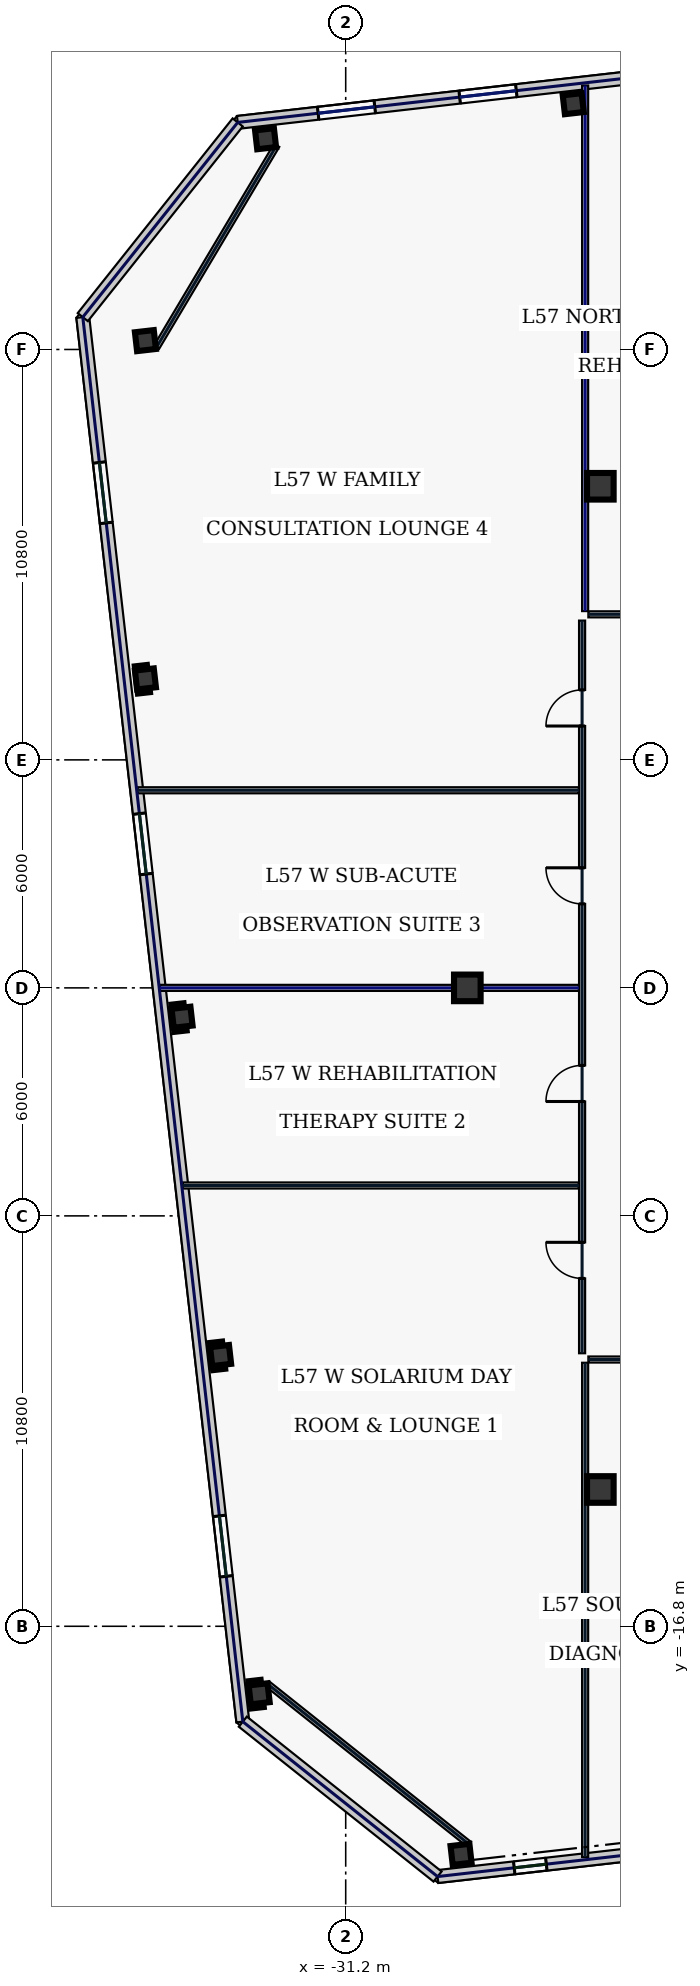
"""IFC4 building model, lengths in metres.
Left out: names, types, materials, properties, quantities, classifications, styles, units other than length and angle.
Written with IfcOpenShell. Run it as: python <this file> out.ifc"""

import sys

from ifc_helpers import new_model, si_unit, direction, frame, frame_2d, origin, origin_2d, place, context, subcontext, project, spatial, rectangle, hollow_rectangle, extrude, element, fill, save


model = new_model("IFC4")
c1 = context("Model", 3, precision=1e-05, world=origin(), true_north=direction((0.0, 1.0)))
c2 = subcontext(c1, "Body", "Model", "MODEL_VIEW")
j1 = project(units=[si_unit("LENGTHUNIT", "METRE"), si_unit("PLANEANGLEUNIT", "RADIAN")], contexts=[c1])
p1 = place(None, origin())
s1 = spatial("IfcSite", under=j1, at=p1, CompositionType="ELEMENT")
p2 = place(p1, origin())
s2 = spatial("IfcBuilding", under=s1, at=p2, CompositionType="ELEMENT")
p3 = place(p2, frame((0.0, 0.0, 247.0)))
s3 = spatial("IfcBuildingStorey", under=s2, at=p3, CompositionType="ELEMENT", Elevation=247.0)
for number, where, z_axis, x_axis in (
    (1, (-24.5, -13.2, 0.0), (0.0, 0.0, 1.0), (1.0, 0.0, 0.0)),
    (2, (-24.5, 13.2, 0.0), (0.0, 0.0, 1.0), (1.0, 0.0, 0.0)),
    (3, (-28.0, 0.0, 0.0), (0.0, 0.0, 1.0), (1.0, 0.0, 0.0)),
):
    element("IfcColumn", number, at=place(p3, frame(where, z_axis=z_axis, x_axis=x_axis)), inside=s3, PredefinedType="COLUMN", context=c2, shape_type="SweptSolid", body=[
        extrude(hollow_rectangle(XDim=0.7, YDim=0.7, WallThickness=0.032, at=origin_2d()), origin(), (0.0, 0.0, 1.0), 3.74),
    ])
for number, where, z_axis, x_axis in (
    (4, (-28.165, -22.802, 0.0), (0.0, 0.0, 1.0), (0.994, 0.113, 0.0)),
    (5, (-25.212, 23.268, 0.0), (0.0, 0.0, 1.0), (0.994, 0.113, 0.0)),
    (6, (-33.309, 22.345, 0.0), (0.0, 0.0, 1.0), (0.994, 0.113, 0.0)),
    (7, (-36.47, 17.033, 0.0), (0.0, 0.0, 1.0), (0.994, 0.113, 0.0)),
    (8, (-36.47, 8.131, 0.0), (0.0, 0.0, 1.0), (0.994, 0.113, 0.0)),
    (9, (-35.506, -0.772, 0.0), (0.0, 0.0, 1.0), (0.994, 0.113, 0.0)),
    (10, (-34.491, -9.674, 0.0), (0.0, 0.0, 1.0), (0.994, 0.113, 0.0)),
    (11, (-33.477, -18.577, 0.0), (0.0, 0.0, 1.0), (0.994, 0.113, 0.0)),
):
    element("IfcColumn", number, at=place(p3, frame(where, z_axis=z_axis, x_axis=x_axis)), inside=s3, PredefinedType="COLUMN", context=c2, shape_type="SweptSolid", body=[
        extrude(hollow_rectangle(XDim=0.5, YDim=0.5, WallThickness=0.025, at=origin_2d()), origin(), (0.0, 0.0, 1.0), 3.74),
    ])
p4 = place(p3, frame((-28.783, -23.386, 0.0), z_axis=(0.0, 0.0, 1.0), x_axis=(0.993572271362, 0.113199565282, 0.0)))
e12 = element("IfcWall", 12, at=p4, inside=s3, PredefinedType="STANDARD", context=c2, shape_type="SweptSolid", body=[
    extrude(rectangle(XDim=18.651, YDim=0.34, at=frame_2d((9.326, 0.0))), origin(), (0.0, 0.0, 1.0), 3.74),
])
p5 = place(p4, frame((2.03, 0.0, 0.88)))
e13 = element("IfcOpeningElement", 13, at=p5, cuts=e12, PredefinedType="OPENING", context=c2, shape_type="SweptSolid", body=[
    extrude(rectangle(XDim=0.85, YDim=1.85, at=frame_2d((0.425, 0.925))), frame((0.0, 0.18, 0.0), z_axis=(0.0, -1.0, 0.0), x_axis=(1.0, 0.0, 0.0)), (0.0, 0.0, 1.0), 0.36),
])
p6 = place(p4, frame((5.779, 0.0, 0.88)))
e14 = element("IfcOpeningElement", 14, at=p6, cuts=e12, PredefinedType="OPENING", context=c2, shape_type="SweptSolid", body=[
    extrude(rectangle(XDim=1.7, YDim=1.95, at=frame_2d((0.85, 0.975))), frame((0.0, 0.18, 0.0), z_axis=(0.0, -1.0, 0.0), x_axis=(1.0, 0.0, 0.0)), (0.0, 0.0, 1.0), 0.36),
])
p7 = place(p4, frame((10.179, 0.0, 0.88)))
e15 = element("IfcOpeningElement", 15, at=p7, cuts=e12, PredefinedType="OPENING", context=c2, shape_type="SweptSolid", body=[
    extrude(rectangle(XDim=1.7, YDim=1.95, at=frame_2d((0.85, 0.975))), frame((0.0, 0.18, 0.0), z_axis=(0.0, -1.0, 0.0), x_axis=(1.0, 0.0, 0.0)), (0.0, 0.0, 1.0), 0.36),
])
p8 = place(p3, frame((-15.51, 24.886, 0.0), z_axis=(0.0, 0.0, 1.0), x_axis=(-0.993572271362, -0.113199565282, 0.0)))
e16 = element("IfcWall", 16, at=p8, inside=s3, PredefinedType="STANDARD", context=c2, shape_type="SweptSolid", body=[
    extrude(rectangle(XDim=18.651, YDim=0.34, at=frame_2d((9.326, 0.0))), origin(), (0.0, 0.0, 1.0), 3.74),
])
p9 = place(p8, frame((15.021, 0.0, 0.83)))
e17 = element("IfcOpeningElement", 17, at=p9, cuts=e16, PredefinedType="OPENING", context=c2, shape_type="SweptSolid", body=[
    extrude(rectangle(XDim=1.5, YDim=2.0, at=frame_2d((0.75, 1.0))), frame((0.0, 0.18, 0.0), z_axis=(0.0, -1.0, 0.0), x_axis=(1.0, 0.0, 0.0)), (0.0, 0.0, 1.0), 0.36),
])
p10 = place(p8, frame((11.273, 0.0, 0.83)))
e18 = element("IfcOpeningElement", 18, at=p10, cuts=e16, PredefinedType="OPENING", context=c2, shape_type="SweptSolid", body=[
    extrude(rectangle(XDim=1.5, YDim=2.0, at=frame_2d((0.75, 1.0))), frame((0.0, 0.18, 0.0), z_axis=(0.0, -1.0, 0.0), x_axis=(1.0, 0.0, 0.0)), (0.0, 0.0, 1.0), 0.36),
])
p11 = place(p8, frame((6.873, 0.0, 0.83)))
e19 = element("IfcOpeningElement", 19, at=p11, cuts=e16, PredefinedType="OPENING", context=c2, shape_type="SweptSolid", body=[
    extrude(rectangle(XDim=1.5, YDim=2.0, at=frame_2d((0.75, 1.0))), frame((0.0, 0.18, 0.0), z_axis=(0.0, -1.0, 0.0), x_axis=(1.0, 0.0, 0.0)), (0.0, 0.0, 1.0), 0.36),
])
p12 = place(p8, frame((3.125, 0.0, 0.83)))
e20 = element("IfcOpeningElement", 20, at=p12, cuts=e16, PredefinedType="OPENING", context=c2, shape_type="SweptSolid", body=[
    extrude(rectangle(XDim=0.85, YDim=1.85, at=frame_2d((0.425, 0.925))), frame((0.0, 0.18, 0.0), z_axis=(0.0, -1.0, 0.0), x_axis=(1.0, 0.0, 0.0)), (0.0, 0.0, 1.0), 0.36),
])
p13 = place(p3, frame((-38.118, 17.651, 0.0), z_axis=(0.0, 0.0, 1.0), x_axis=(0.11320360501, -0.9935718111, 0.0)))
e21 = element("IfcWall", 21, at=p13, inside=s3, PredefinedType="STANDARD", context=c2, shape_type="SweptSolid", body=[
    extrude(rectangle(XDim=37.2, YDim=0.34, at=frame_2d((18.6, 0.0))), origin(), (0.0, 0.0, 1.0), 3.74),
])
p14 = place(p13, frame((3.85, 0.0, 0.58)))
e22 = element("IfcOpeningElement", 22, at=p14, cuts=e21, PredefinedType="OPENING", context=c2, shape_type="SweptSolid", body=[
    extrude(rectangle(XDim=1.6, YDim=2.3, at=frame_2d((0.8, 1.15))), frame((0.0, 0.18, 0.0), z_axis=(0.0, -1.0, 0.0), x_axis=(1.0, 0.0, 0.0)), (0.0, 0.0, 1.0), 0.36),
])
p15 = place(p13, frame((13.15, 0.0, 0.58)))
e23 = element("IfcOpeningElement", 23, at=p15, cuts=e21, PredefinedType="OPENING", context=c2, shape_type="SweptSolid", body=[
    extrude(rectangle(XDim=1.6, YDim=2.3, at=frame_2d((0.8, 1.15))), frame((0.0, 0.18, 0.0), z_axis=(0.0, -1.0, 0.0), x_axis=(1.0, 0.0, 0.0)), (0.0, 0.0, 1.0), 0.36),
])
p16 = place(p13, frame((31.75, 0.0, 0.58)))
e24 = element("IfcOpeningElement", 24, at=p16, cuts=e21, PredefinedType="OPENING", context=c2, shape_type="SweptSolid", body=[
    extrude(rectangle(XDim=1.6, YDim=2.3, at=frame_2d((0.8, 1.15))), frame((0.0, 0.18, 0.0), z_axis=(0.0, -1.0, 0.0), x_axis=(1.0, 0.0, 0.0)), (0.0, 0.0, 1.0), 0.36),
])
for number, where, z_axis, x_axis in (
    (25, (-34.042, 22.775, 0.0), (0.0, 0.0, 1.0), (-0.623, -0.783, 0.0)),
    (26, (-33.907, -19.31, 0.0), (0.0, 0.0, 1.0), (0.783, -0.623, 0.0)),
):
    element("IfcWall", number, at=place(p3, frame(where, z_axis=z_axis, x_axis=x_axis)), inside=s3, PredefinedType="STANDARD", context=c2, shape_type="SweptSolid", body=[
        extrude(rectangle(XDim=6.548, YDim=0.34, at=frame_2d((3.274, 0.0))), origin(), (0.0, 0.0, 1.0), 3.74),
    ])
p17 = place(p3, frame((-33.016, 22.171, 0.0), z_axis=(0.0, 0.0, 1.0), x_axis=(-0.511385266265, -0.859351563359, 0.0)))
e27 = element("IfcWall", 27, at=p17, inside=s3, PredefinedType="PARTITIONING", context=c2, shape_type="SweptSolid", body=[
    extrude(rectangle(XDim=6.182, YDim=0.16, at=frame_2d((3.091, 0.0))), origin(), (0.0, 0.0, 1.0), 3.74),
])
p18 = place(p3, frame((-33.265, -18.311, 0.0), z_axis=(0.0, 0.0, 1.0), x_axis=(0.782602647064, -0.622521563328, 0.0)))
e28 = element("IfcWall", 28, at=p18, inside=s3, PredefinedType="PARTITIONING", context=c2, shape_type="SweptSolid", body=[
    extrude(rectangle(XDim=6.788, YDim=0.16, at=frame_2d((3.394, 0.0))), origin(), (0.0, 0.0, 1.0), 3.74),
])
p19 = place(p3, frame((-24.98, -9.615, 0.0), z_axis=(0.0, 0.0, 1.0), x_axis=(0.0, 1.0, 0.0)))
e29 = element("IfcWall", 29, at=p19, inside=s3, PredefinedType="PARTITIONING", context=c2, shape_type="SweptSolid", body=[
    extrude(rectangle(XDim=19.28, YDim=0.16, at=frame_2d((9.64, 0.0))), origin(), (0.0, 0.0, 1.0), 3.74),
])
p20 = place(p19, frame((1.969, 0.0, 0.0)))
e30 = element("IfcOpeningElement", 30, at=p20, cuts=e29, PredefinedType="OPENING", context=c2, shape_type="SweptSolid", body=[
    extrude(rectangle(XDim=0.95, YDim=2.2, at=frame_2d((0.475, 1.1))), frame((0.0, 0.09, 0.0), z_axis=(0.0, -1.0, 0.0), x_axis=(1.0, 0.0, 0.0)), (0.0, 0.0, 1.0), 0.18),
])
p21 = place(p19, frame((6.625, 0.0, 0.0)))
e31 = element("IfcOpeningElement", 31, at=p21, cuts=e29, PredefinedType="OPENING", context=c2, shape_type="SweptSolid", body=[
    extrude(rectangle(XDim=0.95, YDim=2.2, at=frame_2d((0.475, 1.1))), frame((0.0, 0.09, 0.0), z_axis=(0.0, -1.0, 0.0), x_axis=(1.0, 0.0, 0.0)), (0.0, 0.0, 1.0), 0.18),
])
p22 = place(p19, frame((11.825, 0.0, 0.0)))
e32 = element("IfcOpeningElement", 32, at=p22, cuts=e29, PredefinedType="OPENING", context=c2, shape_type="SweptSolid", body=[
    extrude(rectangle(XDim=0.95, YDim=2.2, at=frame_2d((0.475, 1.1))), frame((0.0, 0.09, 0.0), z_axis=(0.0, -1.0, 0.0), x_axis=(1.0, 0.0, 0.0)), (0.0, 0.0, 1.0), 0.18),
])
p23 = place(p19, frame((16.506, 0.0, 0.0)))
e33 = element("IfcOpeningElement", 33, at=p23, cuts=e29, PredefinedType="OPENING", context=c2, shape_type="SweptSolid", body=[
    extrude(rectangle(XDim=0.95, YDim=2.2, at=frame_2d((0.475, 1.1))), frame((0.0, 0.09, 0.0), z_axis=(0.0, -1.0, 0.0), x_axis=(1.0, 0.0, 0.0)), (0.0, 0.0, 1.0), 0.18),
])
p24 = place(p3, frame((-24.815, 9.83, 0.0), z_axis=(0.0, 0.0, 1.0), x_axis=(1.0, 0.0, 0.0)))
e34 = element("IfcWall", 34, at=p24, inside=s3, PredefinedType="PARTITIONING", context=c2, shape_type="SweptSolid", body=[
    extrude(rectangle(XDim=49.63, YDim=0.16, at=frame_2d((24.815, 0.0))), origin(), (0.0, 0.0, 1.0), 3.74),
])
p25 = place(p24, frame((2.044, 0.0, 0.0)))
e35 = element("IfcOpeningElement", 35, at=p25, cuts=e34, PredefinedType="OPENING", context=c2, shape_type="SweptSolid", body=[
    extrude(rectangle(XDim=0.95, YDim=2.2, at=frame_2d((0.475, 1.1))), frame((0.0, 0.09, 0.0), z_axis=(0.0, -1.0, 0.0), x_axis=(1.0, 0.0, 0.0)), (0.0, 0.0, 1.0), 0.18),
])
p26 = place(p24, frame((8.825, 0.0, 0.0)))
e36 = element("IfcOpeningElement", 36, at=p26, cuts=e34, PredefinedType="OPENING", context=c2, shape_type="SweptSolid", body=[
    extrude(rectangle(XDim=1.3, YDim=2.2, at=frame_2d((0.65, 1.1))), frame((0.0, 0.09, 0.0), z_axis=(0.0, -1.0, 0.0), x_axis=(1.0, 0.0, 0.0)), (0.0, 0.0, 1.0), 0.18),
])
p27 = place(p24, frame((16.4, 0.0, 0.0)))
e37 = element("IfcOpeningElement", 37, at=p27, cuts=e34, PredefinedType="OPENING", context=c2, shape_type="SweptSolid", body=[
    extrude(rectangle(XDim=0.95, YDim=2.2, at=frame_2d((0.475, 1.1))), frame((0.0, 0.09, 0.0), z_axis=(0.0, -1.0, 0.0), x_axis=(1.0, 0.0, 0.0)), (0.0, 0.0, 1.0), 0.18),
])
p28 = place(p24, frame((21.1, 0.0, 0.0)))
e38 = element("IfcOpeningElement", 38, at=p28, cuts=e34, PredefinedType="OPENING", context=c2, shape_type="SweptSolid", body=[
    extrude(rectangle(XDim=1.05, YDim=2.2, at=frame_2d((0.525, 1.1))), frame((0.0, 0.09, 0.0), z_axis=(0.0, -1.0, 0.0), x_axis=(1.0, 0.0, 0.0)), (0.0, 0.0, 1.0), 0.18),
])
p29 = place(p24, frame((26.482, 0.0, 0.0)))
e39 = element("IfcOpeningElement", 39, at=p29, cuts=e34, PredefinedType="OPENING", context=c2, shape_type="SweptSolid", body=[
    extrude(rectangle(XDim=0.95, YDim=2.2, at=frame_2d((0.475, 1.1))), frame((0.0, 0.09, 0.0), z_axis=(0.0, -1.0, 0.0), x_axis=(1.0, 0.0, 0.0)), (0.0, 0.0, 1.0), 0.18),
])
p30 = place(p24, frame((32.548, 0.0, 0.0)))
e40 = element("IfcOpeningElement", 40, at=p30, cuts=e34, PredefinedType="OPENING", context=c2, shape_type="SweptSolid", body=[
    extrude(rectangle(XDim=1.15, YDim=2.2, at=frame_2d((0.575, 1.1))), frame((0.0, 0.09, 0.0), z_axis=(0.0, -1.0, 0.0), x_axis=(1.0, 0.0, 0.0)), (0.0, 0.0, 1.0), 0.18),
])
p31 = place(p24, frame((38.815, 0.0, 0.0)))
e41 = element("IfcOpeningElement", 41, at=p31, cuts=e34, PredefinedType="OPENING", context=c2, shape_type="SweptSolid", body=[
    extrude(rectangle(XDim=1.45, YDim=2.2, at=frame_2d((0.725, 1.1))), frame((0.0, 0.09, 0.0), z_axis=(0.0, -1.0, 0.0), x_axis=(1.0, 0.0, 0.0)), (0.0, 0.0, 1.0), 0.18),
])
p32 = place(p24, frame((45.606, 0.0, 0.0)))
e42 = element("IfcOpeningElement", 42, at=p32, cuts=e34, PredefinedType="OPENING", context=c2, shape_type="SweptSolid", body=[
    extrude(rectangle(XDim=1.3, YDim=2.2, at=frame_2d((0.65, 1.1))), frame((0.0, 0.09, 0.0), z_axis=(0.0, -1.0, 0.0), x_axis=(1.0, 0.0, 0.0)), (0.0, 0.0, 1.0), 0.18),
])
p33 = place(p3, frame((12.535, -9.78, 0.0), z_axis=(0.0, 0.0, 1.0), x_axis=(-1.0, 0.0, 0.0)))
e43 = element("IfcWall", 43, at=p33, inside=s3, PredefinedType="PARTITIONING", context=c2, shape_type="SweptSolid", body=[
    extrude(rectangle(XDim=37.35, YDim=0.16, at=frame_2d((18.675, 0.0))), origin(), (0.0, 0.0, 1.0), 3.74),
])
p34 = place(p33, frame((34.526, 0.0, 0.0)))
e44 = element("IfcOpeningElement", 44, at=p34, cuts=e43, PredefinedType="OPENING", context=c2, shape_type="SweptSolid", body=[
    extrude(rectangle(XDim=1.05, YDim=2.2, at=frame_2d((0.525, 1.1))), frame((0.0, 0.09, 0.0), z_axis=(0.0, -1.0, 0.0), x_axis=(1.0, 0.0, 0.0)), (0.0, 0.0, 1.0), 0.18),
])
p35 = place(p33, frame((29.22, 0.0, 0.0)))
e45 = element("IfcOpeningElement", 45, at=p35, cuts=e43, PredefinedType="OPENING", context=c2, shape_type="SweptSolid", body=[
    extrude(rectangle(XDim=0.95, YDim=2.2, at=frame_2d((0.475, 1.1))), frame((0.0, 0.09, 0.0), z_axis=(0.0, -1.0, 0.0), x_axis=(1.0, 0.0, 0.0)), (0.0, 0.0, 1.0), 0.18),
])
p36 = place(p33, frame((22.02, 0.0, 0.0)))
e46 = element("IfcOpeningElement", 46, at=p36, cuts=e43, PredefinedType="OPENING", context=c2, shape_type="SweptSolid", body=[
    extrude(rectangle(XDim=1.3, YDim=2.2, at=frame_2d((0.65, 1.1))), frame((0.0, 0.09, 0.0), z_axis=(0.0, -1.0, 0.0), x_axis=(1.0, 0.0, 0.0)), (0.0, 0.0, 1.0), 0.18),
])
p37 = place(p33, frame((14.045, 0.0, 0.0)))
e47 = element("IfcOpeningElement", 47, at=p37, cuts=e43, PredefinedType="OPENING", context=c2, shape_type="SweptSolid", body=[
    extrude(rectangle(XDim=0.95, YDim=2.2, at=frame_2d((0.475, 1.1))), frame((0.0, 0.09, 0.0), z_axis=(0.0, -1.0, 0.0), x_axis=(1.0, 0.0, 0.0)), (0.0, 0.0, 1.0), 0.18),
])
p38 = place(p33, frame((5.345, 0.0, 0.0)))
e48 = element("IfcOpeningElement", 48, at=p38, cuts=e43, PredefinedType="OPENING", context=c2, shape_type="SweptSolid", body=[
    extrude(rectangle(XDim=1.15, YDim=2.2, at=frame_2d((0.575, 1.1))), frame((0.0, 0.09, 0.0), z_axis=(0.0, -1.0, 0.0), x_axis=(1.0, 0.0, 0.0)), (0.0, 0.0, 1.0), 0.18),
])
p39 = place(p3, frame((-24.9, 9.915, 0.0), z_axis=(0.0, 0.0, 1.0), x_axis=(0.0, 1.0, 0.0)))
e49 = element("IfcWall", 49, at=p39, inside=s3, PredefinedType="PARTITIONING", context=c2, shape_type="SweptSolid", body=[
    extrude(rectangle(XDim=13.831, YDim=0.16, at=frame_2d((6.916, 0.0))), origin(), (0.0, 0.0, 1.0), 3.285),
])
p40 = place(p3, frame((-24.9, -22.873, 0.0), z_axis=(0.0, 0.0, 1.0), x_axis=(0.0, 1.0, 0.0)))
e50 = element("IfcWall", 50, at=p40, inside=s3, PredefinedType="PARTITIONING", context=c2, shape_type="SweptSolid", body=[
    extrude(rectangle(XDim=13.008, YDim=0.16, at=frame_2d((6.504, 0.0))), origin(), (0.0, 0.0, 1.0), 3.74),
])
p41 = place(p3, frame((-35.494, -5.2, 0.0), z_axis=(0.0, 0.0, 1.0), x_axis=(1.0, 0.0, 0.0)))
e51 = element("IfcWall", 51, at=p41, inside=s3, PredefinedType="PARTITIONING", context=c2, shape_type="SweptSolid", body=[
    extrude(rectangle(XDim=10.429, YDim=0.16, at=frame_2d((5.215, 0.0))), origin(), (0.0, 0.0, 1.0), 3.74),
])
p42 = place(p3, frame((-36.087, 0.0, 0.0), z_axis=(0.0, 0.0, 1.0), x_axis=(1.0, 0.0, 0.0)))
e52 = element("IfcWall", 52, at=p42, inside=s3, PredefinedType="PARTITIONING", context=c2, shape_type="SweptSolid", body=[
    extrude(rectangle(XDim=11.022, YDim=0.16, at=frame_2d((5.511, 0.0))), origin(), (0.0, 0.0, 1.0), 3.285),
])
p43 = place(p3, frame((-36.679, 5.2, 0.0), z_axis=(0.0, 0.0, 1.0), x_axis=(1.0, 0.0, 0.0)))
e53 = element("IfcWall", 53, at=p43, inside=s3, PredefinedType="PARTITIONING", context=c2, shape_type="SweptSolid", body=[
    extrude(rectangle(XDim=11.615, YDim=0.16, at=frame_2d((5.807, 0.0))), origin(), (0.0, 0.0, 1.0), 3.74),
])
p44 = place(p5, origin())
e54 = element("IfcWindow", 54, at=p44, inside=s3, PartitioningType="SINGLE_PANEL", PredefinedType="WINDOW", context=c2, shape_type="SweptSolid", body=[
    extrude(rectangle(XDim=0.85, YDim=1.85, at=frame_2d((0.425, 0.925))), frame((0.0, 0.03, 0.0), z_axis=(0.0, -1.0, 0.0), x_axis=(1.0, 0.0, 0.0)), (0.0, 0.0, 1.0), 0.06),
])
fill(e13, e54)
p45 = place(p9, origin())
e55 = element("IfcWindow", 55, at=p45, inside=s3, PartitioningType="SINGLE_PANEL", PredefinedType="WINDOW", context=c2, shape_type="SweptSolid", body=[
    extrude(rectangle(XDim=1.5, YDim=2.0, at=frame_2d((0.75, 1.0))), frame((0.0, 0.03, 0.0), z_axis=(0.0, -1.0, 0.0), x_axis=(1.0, 0.0, 0.0)), (0.0, 0.0, 1.0), 0.06),
])
fill(e17, e55)
p46 = place(p10, origin())
e56 = element("IfcWindow", 56, at=p46, inside=s3, PartitioningType="SINGLE_PANEL", PredefinedType="WINDOW", context=c2, shape_type="SweptSolid", body=[
    extrude(rectangle(XDim=1.5, YDim=2.0, at=frame_2d((0.75, 1.0))), frame((0.0, 0.03, 0.0), z_axis=(0.0, -1.0, 0.0), x_axis=(1.0, 0.0, 0.0)), (0.0, 0.0, 1.0), 0.06),
])
fill(e18, e56)
p47 = place(p14, origin())
e57 = element("IfcWindow", 57, at=p47, inside=s3, PartitioningType="SINGLE_PANEL", PredefinedType="WINDOW", context=c2, shape_type="SweptSolid", body=[
    extrude(rectangle(XDim=1.6, YDim=2.3, at=frame_2d((0.8, 1.15))), frame((0.0, 0.03, 0.0), z_axis=(0.0, -1.0, 0.0), x_axis=(1.0, 0.0, 0.0)), (0.0, 0.0, 1.0), 0.06),
])
fill(e22, e57)
p48 = place(p15, origin())
e58 = element("IfcWindow", 58, at=p48, inside=s3, PartitioningType="SINGLE_PANEL", PredefinedType="WINDOW", context=c2, shape_type="SweptSolid", body=[
    extrude(rectangle(XDim=1.6, YDim=2.3, at=frame_2d((0.8, 1.15))), frame((0.0, 0.03, 0.0), z_axis=(0.0, -1.0, 0.0), x_axis=(1.0, 0.0, 0.0)), (0.0, 0.0, 1.0), 0.06),
])
fill(e23, e58)
p49 = place(p16, origin())
e59 = element("IfcWindow", 59, at=p49, inside=s3, PartitioningType="SINGLE_PANEL", PredefinedType="WINDOW", context=c2, shape_type="SweptSolid", body=[
    extrude(rectangle(XDim=1.6, YDim=2.3, at=frame_2d((0.8, 1.15))), frame((0.0, 0.03, 0.0), z_axis=(0.0, -1.0, 0.0), x_axis=(1.0, 0.0, 0.0)), (0.0, 0.0, 1.0), 0.06),
])
fill(e24, e59)
p50 = place(p20, origin())
e60 = element("IfcDoor", 60, at=p50, inside=s3, OperationType="SINGLE_SWING_RIGHT", PredefinedType="DOOR", context=c2, shape_type="SweptSolid", body=[
    extrude(rectangle(XDim=0.95, YDim=2.2, at=frame_2d((0.475, 1.1))), frame((0.0, 0.025, 0.0), z_axis=(0.0, -1.0, 0.0), x_axis=(1.0, 0.0, 0.0)), (0.0, 0.0, 1.0), 0.05),
])
fill(e30, e60)
p51 = place(p21, origin())
e61 = element("IfcDoor", 61, at=p51, inside=s3, OperationType="SINGLE_SWING_LEFT", PredefinedType="DOOR", context=c2, shape_type="SweptSolid", body=[
    extrude(rectangle(XDim=0.95, YDim=2.2, at=frame_2d((0.475, 1.1))), frame((0.0, 0.025, 0.0), z_axis=(0.0, -1.0, 0.0), x_axis=(1.0, 0.0, 0.0)), (0.0, 0.0, 1.0), 0.05),
])
fill(e31, e61)
p52 = place(p22, origin())
e62 = element("IfcDoor", 62, at=p52, inside=s3, OperationType="SINGLE_SWING_RIGHT", PredefinedType="DOOR", context=c2, shape_type="SweptSolid", body=[
    extrude(rectangle(XDim=0.95, YDim=2.2, at=frame_2d((0.475, 1.1))), frame((0.0, 0.025, 0.0), z_axis=(0.0, -1.0, 0.0), x_axis=(1.0, 0.0, 0.0)), (0.0, 0.0, 1.0), 0.05),
])
fill(e32, e62)
p53 = place(p23, origin())
e63 = element("IfcDoor", 63, at=p53, inside=s3, OperationType="SINGLE_SWING_LEFT", PredefinedType="DOOR", context=c2, shape_type="SweptSolid", body=[
    extrude(rectangle(XDim=0.95, YDim=2.2, at=frame_2d((0.475, 1.1))), frame((0.0, 0.025, 0.0), z_axis=(0.0, -1.0, 0.0), x_axis=(1.0, 0.0, 0.0)), (0.0, 0.0, 1.0), 0.05),
])
fill(e33, e63)
save(model, sys.argv[1])
